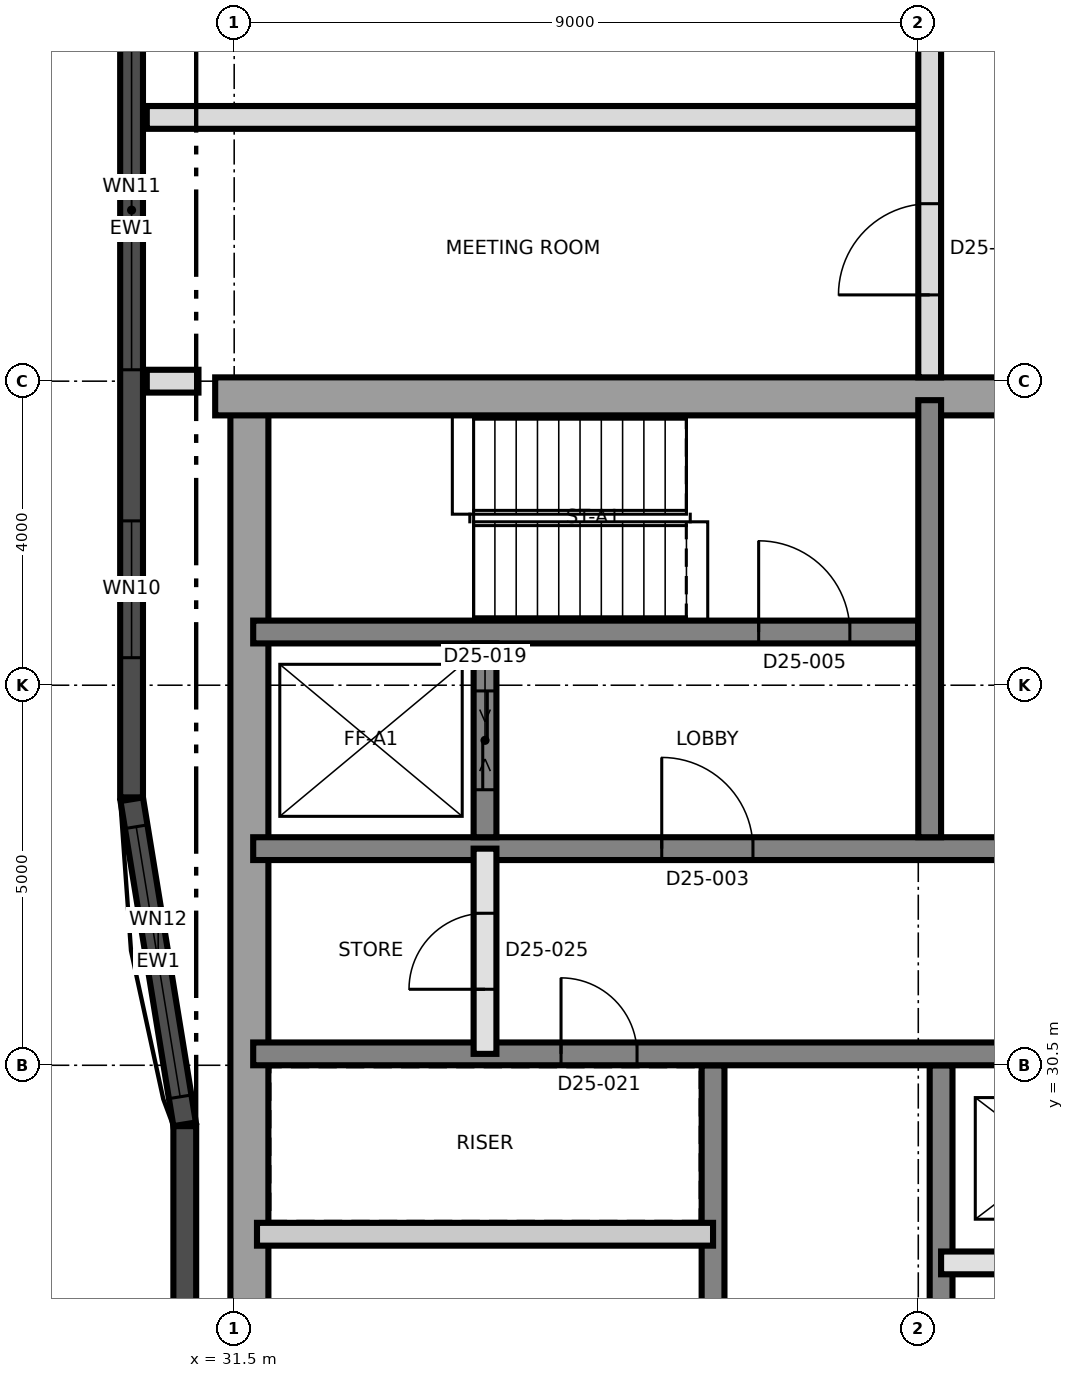
"""IFC4 building model, lengths in metres.
Left out: names, types, materials, properties, quantities, classifications, styles, units other than length and angle.
Written with IfcOpenShell. Run it as: python <this file> out.ifc"""

import sys

from ifc_helpers import new_model, si_unit, direction, frame, frame_2d, origin, place, context, subcontext, project, spatial, rectangle, extrude, element, fill, save


model = new_model("IFC4")
c1 = context("Model", 3, precision=1e-05, world=origin(), true_north=direction((0.0, 1.0)))
c2 = subcontext(c1, "Body", "Model", "MODEL_VIEW")
j1 = project(units=[si_unit("LENGTHUNIT", "METRE"), si_unit("PLANEANGLEUNIT", "RADIAN")], contexts=[c1])
p1 = place(None, origin())
s1 = spatial("IfcSite", under=j1, at=p1, CompositionType="ELEMENT")
p2 = place(p1, origin())
s2 = spatial("IfcBuilding", under=s1, at=p2, CompositionType="ELEMENT")
p3 = place(p2, frame((0.0, 0.0, 229.1)))
s3 = spatial("IfcBuildingStorey", under=s2, at=p3, CompositionType="ELEMENT", Elevation=229.1)
p4 = place(p3, frame((31.7, 21.75, 0.0), z_axis=(0.0, 0.0, 1.0), x_axis=(0.0, 1.0, 0.0)))
e1 = element("IfcWall", 1, at=p4, inside=s3, PredefinedType="SHEAR", context=c2, shape_type="SweptSolid", body=[
    extrude(rectangle(XDim=17.5, YDim=0.5, at=frame_2d((8.75, 0.0))), origin(), (0.0, 0.0, 1.0), 3.7),
])
p5 = place(p3, frame((31.25, 39.3, 0.0), z_axis=(0.0, 0.0, 1.0), x_axis=(1.0, 0.0, 0.0)))
e2 = element("IfcWall", 2, at=p5, inside=s3, PredefinedType="SHEAR", context=c2, shape_type="SweptSolid", body=[
    extrude(rectangle(XDim=27.0, YDim=0.5, at=frame_2d((13.5, 0.0))), origin(), (0.0, 0.0, 1.0), 3.7),
])
p6 = place(p5, frame((10.45, 0.0, 0.0)))
e3 = element("IfcOpeningElement", 3, at=p6, cuts=e2, PredefinedType="OPENING", context=c2, shape_type="SweptSolid", body=[
    extrude(rectangle(XDim=1.2, YDim=2.1, at=frame_2d((0.6, 1.05))), frame((0.0, 0.26, 0.0), z_axis=(0.0, -1.0, 0.0), x_axis=(1.0, 0.0, 0.0)), (0.0, 0.0, 1.0), 0.52),
])
p7 = place(p3, frame((37.8, 21.75, 0.0), z_axis=(0.0, 0.0, 1.0), x_axis=(0.0, 1.0, 0.0)))
e4 = element("IfcWall", 4, at=p7, inside=s3, PredefinedType="SHEAR", context=c2, shape_type="SweptSolid", body=[
    extrude(rectangle(XDim=8.75, YDim=0.3, at=frame_2d((4.375, 0.0))), origin(), (0.0, 0.0, 1.0), 3.7),
])
p8 = place(p7, frame((4.338, 0.0, 0.0)))
e5 = element("IfcOpeningElement", 5, at=p8, cuts=e4, PredefinedType="OPENING", context=c2, shape_type="SweptSolid", body=[
    extrude(rectangle(XDim=1.0, YDim=2.1, at=frame_2d((0.5, 1.05))), frame((0.0, 0.16, 0.0), z_axis=(0.0, -1.0, 0.0), x_axis=(1.0, 0.0, 0.0)), (0.0, 0.0, 1.0), 0.32),
])
p9 = place(p3, frame((40.8, 21.75, 0.0), z_axis=(0.0, 0.0, 1.0), x_axis=(0.0, 1.0, 0.0)))
e6 = element("IfcWall", 6, at=p9, inside=s3, PredefinedType="SHEAR", context=c2, shape_type="SweptSolid", body=[
    extrude(rectangle(XDim=8.75, YDim=0.3, at=frame_2d((4.375, 0.0))), origin(), (0.0, 0.0, 1.0), 3.7),
])
p10 = place(p9, frame((3.9, 0.0, 0.0)))
e7 = element("IfcOpeningElement", 7, at=p10, cuts=e6, PredefinedType="OPENING", context=c2, shape_type="SweptSolid", body=[
    extrude(rectangle(XDim=1.5, YDim=2.1, at=frame_2d((0.75, 1.05))), frame((0.0, 0.16, 0.0), z_axis=(0.0, -1.0, 0.0), x_axis=(1.0, 0.0, 0.0)), (0.0, 0.0, 1.0), 0.32),
])
p11 = place(p3, frame((31.75, 30.65, 0.0), z_axis=(0.0, 0.0, 1.0), x_axis=(1.0, 0.0, 0.0)))
e8 = element("IfcWall", 8, at=p11, inside=s3, PredefinedType="SHEAR", context=c2, shape_type="SweptSolid", body=[
    extrude(rectangle(XDim=26.5, YDim=0.3, at=frame_2d((13.25, 0.0))), origin(), (0.0, 0.0, 1.0), 3.7),
])
p12 = place(p11, frame((24.75, 0.0, 0.0)))
e9 = element("IfcOpeningElement", 9, at=p12, cuts=e8, PredefinedType="OPENING", context=c2, shape_type="SweptSolid", body=[
    extrude(rectangle(XDim=1.0, YDim=2.1, at=frame_2d((0.5, 1.05))), frame((0.0, 0.16, 0.0), z_axis=(0.0, -1.0, 0.0), x_axis=(1.0, 0.0, 0.0)), (0.0, 0.0, 1.0), 0.32),
])
p13 = place(p11, frame((4.05, 0.0, 0.0)))
e10 = element("IfcOpeningElement", 10, at=p13, cuts=e8, PredefinedType="OPENING", context=c2, shape_type="SweptSolid", body=[
    extrude(rectangle(XDim=1.0, YDim=2.1, at=frame_2d((0.5, 1.05))), frame((0.0, 0.16, 0.0), z_axis=(0.0, -1.0, 0.0), x_axis=(1.0, 0.0, 0.0)), (0.0, 0.0, 1.0), 0.32),
])
p14 = place(p3, frame((31.75, 33.35, 0.0), z_axis=(0.0, 0.0, 1.0), x_axis=(1.0, 0.0, 0.0)))
e11 = element("IfcWall", 11, at=p14, inside=s3, PredefinedType="SHEAR", context=c2, shape_type="SweptSolid", body=[
    extrude(rectangle(XDim=26.5, YDim=0.3, at=frame_2d((13.25, 0.0))), origin(), (0.0, 0.0, 1.0), 3.7),
])
p15 = place(p14, frame((13.9, 0.0, 0.0)))
e12 = element("IfcOpeningElement", 12, at=p15, cuts=e11, PredefinedType="OPENING", context=c2, shape_type="SweptSolid", body=[
    extrude(rectangle(XDim=1.4, YDim=2.1, at=frame_2d((0.7, 1.05))), frame((0.0, 0.16, 0.0), z_axis=(0.0, -1.0, 0.0), x_axis=(1.0, 0.0, 0.0)), (0.0, 0.0, 1.0), 0.32),
])
p16 = place(p14, frame((5.375, 0.0, 0.0)))
e13 = element("IfcOpeningElement", 13, at=p16, cuts=e11, PredefinedType="OPENING", context=c2, shape_type="SweptSolid", body=[
    extrude(rectangle(XDim=1.2, YDim=2.1, at=frame_2d((0.6, 1.05))), frame((0.0, 0.16, 0.0), z_axis=(0.0, -1.0, 0.0), x_axis=(1.0, 0.0, 0.0)), (0.0, 0.0, 1.0), 0.32),
])
p17 = place(p14, frame((19.925, 0.0, 0.0)))
e14 = element("IfcOpeningElement", 14, at=p17, cuts=e11, PredefinedType="OPENING", context=c2, shape_type="SweptSolid", body=[
    extrude(rectangle(XDim=1.2, YDim=2.1, at=frame_2d((0.6, 1.05))), frame((0.0, 0.16, 0.0), z_axis=(0.0, -1.0, 0.0), x_axis=(1.0, 0.0, 0.0)), (0.0, 0.0, 1.0), 0.32),
])
p18 = place(p3, frame((31.75, 36.2, 0.0), z_axis=(0.0, 0.0, 1.0), x_axis=(1.0, 0.0, 0.0)))
e15 = element("IfcWall", 15, at=p18, inside=s3, PredefinedType="SHEAR", context=c2, shape_type="SweptSolid", body=[
    extrude(rectangle(XDim=8.75, YDim=0.3, at=frame_2d((4.375, 0.0))), origin(), (0.0, 0.0, 1.0), 3.7),
])
p19 = place(p18, frame((6.65, 0.0, 0.0)))
e16 = element("IfcOpeningElement", 16, at=p19, cuts=e15, PredefinedType="OPENING", context=c2, shape_type="SweptSolid", body=[
    extrude(rectangle(XDim=1.2, YDim=2.1, at=frame_2d((0.6, 1.05))), frame((0.0, 0.16, 0.0), z_axis=(0.0, -1.0, 0.0), x_axis=(1.0, 0.0, 0.0)), (0.0, 0.0, 1.0), 0.32),
])
p20 = place(p3, frame((40.65, 33.5, 0.0), z_axis=(0.0, 0.0, 1.0), x_axis=(0.0, 1.0, 0.0)))
e17 = element("IfcWall", 17, at=p20, inside=s3, PredefinedType="SHEAR", context=c2, shape_type="SweptSolid", body=[
    extrude(rectangle(XDim=5.75, YDim=0.3, at=frame_2d((2.875, 0.0))), origin(), (0.0, 0.0, 1.0), 3.7),
])
p21 = place(p3, frame((34.8, 33.5, 0.0), z_axis=(0.0, 0.0, 1.0), x_axis=(0.0, 1.0, 0.0)))
e18 = element("IfcWall", 18, at=p21, inside=s3, PredefinedType="SHEAR", context=c2, shape_type="SweptSolid", body=[
    extrude(rectangle(XDim=2.55, YDim=0.3, at=frame_2d((1.275, 0.0))), origin(), (0.0, 0.0, 1.0), 3.7),
])
p22 = place(p21, frame((0.625, 0.0, 0.0)))
e19 = element("IfcOpeningElement", 19, at=p22, cuts=e18, PredefinedType="OPENING", context=c2, shape_type="SweptSolid", body=[
    extrude(rectangle(XDim=1.3, YDim=2.4, at=frame_2d((0.65, 1.2))), frame((0.0, 0.16, 0.0), z_axis=(0.0, -1.0, 0.0), x_axis=(1.0, 0.0, 0.0)), (0.0, 0.0, 1.0), 0.32),
])
p23 = place(p3, frame((30.85, 29.699, 0.0), z_axis=(0.0, 0.0, 1.0), x_axis=(0.0, -1.0, 0.0)))
e20 = element("IfcWall", 20, at=p23, inside=s3, PredefinedType="SOLIDWALL", context=c2, shape_type="SweptSolid", body=[
    extrude(rectangle(XDim=8.34, YDim=0.3, at=frame_2d((4.17, 0.0))), origin(), (0.0, 0.0, 1.0), 3.4),
])
p24 = place(p3, frame((30.15, 48.992, 0.0), z_axis=(0.0, 0.0, 1.0), x_axis=(0.0, -1.0, 0.0)))
e21 = element("IfcWall", 21, at=p24, inside=s3, PredefinedType="SOLIDWALL", context=c2, shape_type="SweptSolid", body=[
    extrude(rectangle(XDim=14.968, YDim=0.3, at=frame_2d((7.484, 0.0))), origin(), (0.0, 0.0, 1.0), 3.4),
])
p25 = place(p24, frame((1.596, 0.0, 0.3)))
e22 = element("IfcOpeningElement", 22, at=p25, cuts=e21, PredefinedType="OPENING", context=c2, shape_type="SweptSolid", body=[
    extrude(rectangle(XDim=1.8, YDim=2.4, at=frame_2d((0.9, 1.2))), frame((0.0, 0.16, 0.0), z_axis=(0.0, -1.0, 0.0), x_axis=(1.0, 0.0, 0.0)), (0.0, 0.0, 1.0), 0.32),
])
p26 = place(p24, frame((5.142, 0.0, 0.9)))
e23 = element("IfcOpeningElement", 23, at=p26, cuts=e21, PredefinedType="OPENING", context=c2, shape_type="SweptSolid", body=[
    extrude(rectangle(XDim=4.2, YDim=1.5, at=frame_2d((2.1, 0.75))), frame((0.0, 0.16, 0.0), z_axis=(0.0, -1.0, 0.0), x_axis=(1.0, 0.0, 0.0)), (0.0, 0.0, 1.0), 0.32),
])
p27 = place(p24, frame((11.33, 0.0, 0.3)))
e24 = element("IfcOpeningElement", 24, at=p27, cuts=e21, PredefinedType="OPENING", context=c2, shape_type="SweptSolid", body=[
    extrude(rectangle(XDim=1.8, YDim=2.4, at=frame_2d((0.9, 1.2))), frame((0.0, 0.16, 0.0), z_axis=(0.0, -1.0, 0.0), x_axis=(1.0, 0.0, 0.0)), (0.0, 0.0, 1.0), 0.32),
])
p28 = place(p3, frame((30.152, 34.0, 0.0), z_axis=(0.0, 0.0, 1.0), x_axis=(0.160697303067, -0.987003736967, 0.0)))
e25 = element("IfcWall", 25, at=p28, inside=s3, PredefinedType="SOLIDWALL", context=c2, shape_type="SweptSolid", body=[
    extrude(rectangle(XDim=4.333, YDim=0.3, at=frame_2d((2.167, 0.0))), origin(), (0.0, 0.0, 1.0), 3.4),
])
p29 = place(p28, frame((0.366, 0.0, 0.9)))
e26 = element("IfcOpeningElement", 26, at=p29, cuts=e25, PredefinedType="OPENING", context=c2, shape_type="SweptSolid", body=[
    extrude(rectangle(XDim=3.6, YDim=1.5, at=frame_2d((1.8, 0.75))), frame((0.0, 0.16, 0.0), z_axis=(0.0, -1.0, 0.0), x_axis=(1.0, 0.0, 0.0)), (0.0, 0.0, 1.0), 0.32),
])
p30 = place(p3, frame((40.8, 27.9, 0.0), z_axis=(0.0, 0.0, 1.0), x_axis=(1.0, 0.0, 0.0)))
e27 = element("IfcWall", 27, at=p30, inside=s3, PredefinedType="SOLIDWALL", context=c2, shape_type="SweptSolid", body=[
    extrude(rectangle(XDim=6.0, YDim=0.3, at=frame_2d((3.0, 0.0))), origin(), (0.0, 0.0, 1.0), 3.4),
])
p31 = place(p30, frame((0.95, 0.0, 0.0)))
e28 = element("IfcOpeningElement", 28, at=p31, cuts=e27, PredefinedType="OPENING", context=c2, shape_type="SweptSolid", body=[
    extrude(rectangle(XDim=1.1, YDim=2.4, at=frame_2d((0.55, 1.2))), frame((0.0, 0.16, 0.0), z_axis=(0.0, -1.0, 0.0), x_axis=(1.0, 0.0, 0.0)), (0.0, 0.0, 1.0), 0.32),
])
p32 = place(p30, frame((3.95, 0.0, 0.0)))
e29 = element("IfcOpeningElement", 29, at=p32, cuts=e27, PredefinedType="OPENING", context=c2, shape_type="SweptSolid", body=[
    extrude(rectangle(XDim=1.1, YDim=2.4, at=frame_2d((0.55, 1.2))), frame((0.0, 0.16, 0.0), z_axis=(0.0, -1.0, 0.0), x_axis=(1.0, 0.0, 0.0)), (0.0, 0.0, 1.0), 0.32),
])
p33 = place(p3, frame((31.8, 28.277, 0.0), z_axis=(0.0, 0.0, 1.0), x_axis=(1.0, 0.0, 0.0)))
e30 = element("IfcWall", 30, at=p33, inside=s3, PredefinedType="PARTITIONING", context=c2, shape_type="SweptSolid", body=[
    extrude(rectangle(XDim=6.0, YDim=0.3, at=frame_2d((3.0, 0.0))), origin(), (0.0, 0.0, 1.0), 3.4),
])
p34 = place(p3, frame((34.8, 30.65, 0.0), z_axis=(0.0, 0.0, 1.0), x_axis=(0.0, 1.0, 0.0)))
e31 = element("IfcWall", 31, at=p34, inside=s3, PredefinedType="SOLIDWALL", context=c2, shape_type="SweptSolid", body=[
    extrude(rectangle(XDim=2.7, YDim=0.3, at=frame_2d((1.35, 0.0))), origin(), (0.0, 0.0, 1.0), 3.4),
])
p35 = place(p34, frame((0.85, 0.0, 0.0)))
e32 = element("IfcOpeningElement", 32, at=p35, cuts=e31, PredefinedType="OPENING", context=c2, shape_type="SweptSolid", body=[
    extrude(rectangle(XDim=1.0, YDim=2.1, at=frame_2d((0.5, 1.05))), frame((0.0, 0.16, 0.0), z_axis=(0.0, -1.0, 0.0), x_axis=(1.0, 0.0, 0.0)), (0.0, 0.0, 1.0), 0.32),
])
p36 = place(p3, frame((30.35, 39.5, 0.0), z_axis=(0.0, 0.0, 1.0), x_axis=(1.0, 0.0, 0.0)))
e33 = element("IfcWall", 33, at=p36, inside=s3, PredefinedType="PARTITIONING", context=c2, shape_type="SweptSolid", body=[
    extrude(rectangle(XDim=0.68, YDim=0.3, at=frame_2d((0.34, 0.0))), origin(), (0.0, 0.0, 1.0), 3.4),
])
p37 = place(p3, frame((30.35, 42.97, 0.0), z_axis=(0.0, 0.0, 1.0), x_axis=(1.0, 0.0, 0.0)))
e34 = element("IfcWall", 34, at=p37, inside=s3, PredefinedType="PARTITIONING", context=c2, shape_type="SweptSolid", body=[
    extrude(rectangle(XDim=10.3, YDim=0.3, at=frame_2d((5.15, 0.0))), origin(), (0.0, 0.0, 1.0), 3.4),
])
p38 = place(p3, frame((40.65, 39.55, 0.0), z_axis=(0.0, 0.0, 1.0), x_axis=(0.0, 1.0, 0.0)))
e35 = element("IfcWall", 35, at=p38, inside=s3, PredefinedType="PARTITIONING", context=c2, shape_type="SweptSolid", body=[
    extrude(rectangle(XDim=19.0, YDim=0.3, at=frame_2d((9.5, 0.0))), origin(), (0.0, 0.0, 1.0), 3.4),
])
p39 = place(p38, frame((1.085, 0.0, 0.0)))
e36 = element("IfcOpeningElement", 36, at=p39, cuts=e35, PredefinedType="OPENING", context=c2, shape_type="SweptSolid", body=[
    extrude(rectangle(XDim=1.2, YDim=2.1, at=frame_2d((0.6, 1.05))), frame((0.0, 0.16, 0.0), z_axis=(0.0, -1.0, 0.0), x_axis=(1.0, 0.0, 0.0)), (0.0, 0.0, 1.0), 0.32),
])
p40 = place(p38, frame((4.335, 0.0, 0.0)))
e37 = element("IfcOpeningElement", 37, at=p40, cuts=e35, PredefinedType="OPENING", context=c2, shape_type="SweptSolid", body=[
    extrude(rectangle(XDim=1.0, YDim=2.1, at=frame_2d((0.5, 1.05))), frame((0.0, 0.16, 0.0), z_axis=(0.0, -1.0, 0.0), x_axis=(1.0, 0.0, 0.0)), (0.0, 0.0, 1.0), 0.32),
])
p41 = place(p38, frame((12.05, 0.0, 0.0)))
e38 = element("IfcOpeningElement", 38, at=p41, cuts=e35, PredefinedType="OPENING", context=c2, shape_type="SweptSolid", body=[
    extrude(rectangle(XDim=1.0, YDim=2.1, at=frame_2d((0.5, 1.05))), frame((0.0, 0.16, 0.0), z_axis=(0.0, -1.0, 0.0), x_axis=(1.0, 0.0, 0.0)), (0.0, 0.0, 1.0), 0.32),
])
p42 = place(p38, frame((13.85, 0.0, 0.0)))
e39 = element("IfcOpeningElement", 39, at=p42, cuts=e35, PredefinedType="OPENING", context=c2, shape_type="SweptSolid", body=[
    extrude(rectangle(XDim=1.0, YDim=2.1, at=frame_2d((0.5, 1.05))), frame((0.0, 0.16, 0.0), z_axis=(0.0, -1.0, 0.0), x_axis=(1.0, 0.0, 0.0)), (0.0, 0.0, 1.0), 0.32),
])
p43 = place(p26, origin())
e40 = element("IfcWindow", 40, at=p43, inside=s3, PartitioningType="SINGLE_PANEL", PredefinedType="WINDOW", context=c2, shape_type="SweptSolid", body=[
    extrude(rectangle(XDim=4.2, YDim=1.5, at=frame_2d((2.1, 0.75))), frame((0.0, 0.03, 0.0), z_axis=(0.0, -1.0, 0.0), x_axis=(1.0, 0.0, 0.0)), (0.0, 0.0, 1.0), 0.06),
])
fill(e23, e40)
p44 = place(p27, origin())
e41 = element("IfcWindow", 41, at=p44, inside=s3, PartitioningType="SINGLE_PANEL", PredefinedType="WINDOW", context=c2, shape_type="SweptSolid", body=[
    extrude(rectangle(XDim=1.8, YDim=2.4, at=frame_2d((0.9, 1.2))), frame((0.0, 0.03, 0.0), z_axis=(0.0, -1.0, 0.0), x_axis=(1.0, 0.0, 0.0)), (0.0, 0.0, 1.0), 0.06),
])
fill(e24, e41)
p45 = place(p29, origin())
e42 = element("IfcWindow", 42, at=p45, inside=s3, PartitioningType="SINGLE_PANEL", PredefinedType="WINDOW", context=c2, shape_type="SweptSolid", body=[
    extrude(rectangle(XDim=3.6, YDim=1.5, at=frame_2d((1.8, 0.75))), frame((0.0, 0.03, 0.0), z_axis=(0.0, -1.0, 0.0), x_axis=(1.0, 0.0, 0.0)), (0.0, 0.0, 1.0), 0.06),
])
fill(e26, e42)
p46 = place(p16, origin())
e43 = element("IfcDoor", 43, at=p46, inside=s3, OperationType="SINGLE_SWING_LEFT", PredefinedType="DOOR", context=c2, shape_type="SweptSolid", body=[
    extrude(rectangle(XDim=1.2, YDim=2.1, at=frame_2d((0.6, 1.05))), frame((0.0, 0.025, 0.0), z_axis=(0.0, -1.0, 0.0), x_axis=(1.0, 0.0, 0.0)), (0.0, 0.0, 1.0), 0.05),
])
fill(e13, e43)
p47 = place(p19, origin())
e44 = element("IfcDoor", 44, at=p47, inside=s3, OperationType="SINGLE_SWING_RIGHT", PredefinedType="DOOR", context=c2, shape_type="SweptSolid", body=[
    extrude(rectangle(XDim=1.2, YDim=2.1, at=frame_2d((0.6, 1.05))), frame((0.0, 0.025, 0.0), z_axis=(0.0, -1.0, 0.0), x_axis=(1.0, 0.0, 0.0)), (0.0, 0.0, 1.0), 0.05),
])
fill(e16, e44)
p48 = place(p22, origin())
e45 = element("IfcDoor", 45, at=p48, inside=s3, OperationType="SLIDING_TO_LEFT", PredefinedType="DOOR", context=c2, shape_type="SweptSolid", body=[
    extrude(rectangle(XDim=1.3, YDim=2.4, at=frame_2d((0.65, 1.2))), frame((0.0, 0.025, 0.0), z_axis=(0.0, -1.0, 0.0), x_axis=(1.0, 0.0, 0.0)), (0.0, 0.0, 1.0), 0.05),
])
fill(e19, e45)
p49 = place(p13, origin())
e46 = element("IfcDoor", 46, at=p49, inside=s3, OperationType="SINGLE_SWING_LEFT", PredefinedType="DOOR", context=c2, shape_type="SweptSolid", body=[
    extrude(rectangle(XDim=1.0, YDim=2.1, at=frame_2d((0.5, 1.05))), frame((0.0, 0.025, 0.0), z_axis=(0.0, -1.0, 0.0), x_axis=(1.0, 0.0, 0.0)), (0.0, 0.0, 1.0), 0.05),
])
fill(e10, e46)
p50 = place(p35, origin())
e47 = element("IfcDoor", 47, at=p50, inside=s3, OperationType="SINGLE_SWING_LEFT", PredefinedType="DOOR", context=c2, shape_type="SweptSolid", body=[
    extrude(rectangle(XDim=1.0, YDim=2.1, at=frame_2d((0.5, 1.05))), frame((0.0, 0.025, 0.0), z_axis=(0.0, -1.0, 0.0), x_axis=(1.0, 0.0, 0.0)), (0.0, 0.0, 1.0), 0.05),
])
fill(e32, e47)
p51 = place(p39, origin())
e48 = element("IfcDoor", 48, at=p51, inside=s3, OperationType="SINGLE_SWING_RIGHT", PredefinedType="DOOR", context=c2, shape_type="SweptSolid", body=[
    extrude(rectangle(XDim=1.2, YDim=2.1, at=frame_2d((0.6, 1.05))), frame((0.0, 0.025, 0.0), z_axis=(0.0, -1.0, 0.0), x_axis=(1.0, 0.0, 0.0)), (0.0, 0.0, 1.0), 0.05),
])
fill(e36, e48)
save(model, sys.argv[1])
